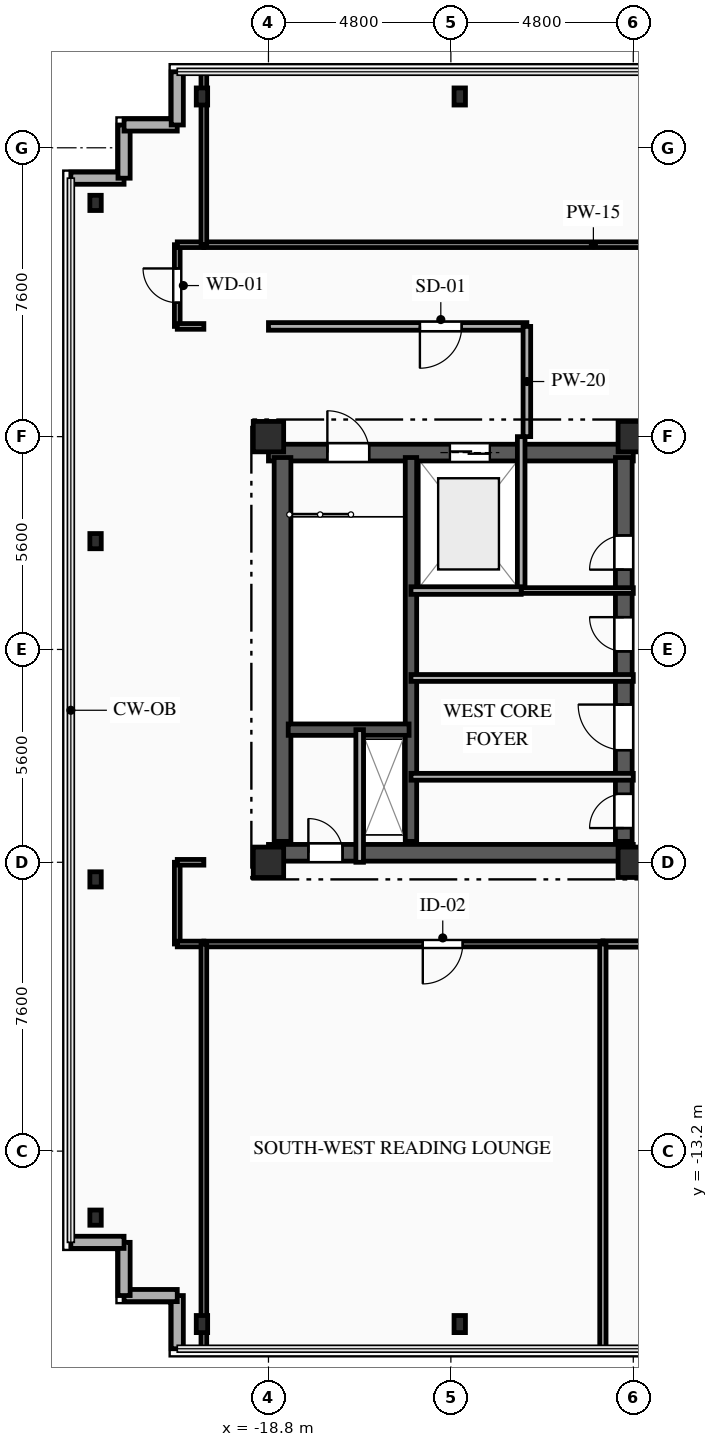
"""IFC4 building model, lengths in metres.
Left out: names, types, materials, properties, quantities, classifications, styles, units other than length and angle.
Written with IfcOpenShell. Run it as: python <this file> out.ifc"""

import sys

from ifc_helpers import new_model, si_unit, direction, frame, frame_2d, origin, origin_2d, place, context, subcontext, project, spatial, rectangle, i_section, extrude, element, fill, save


model = new_model("IFC4")
c1 = context("Model", 3, precision=1e-05, world=origin(), true_north=direction((0.0, 1.0)))
c2 = subcontext(c1, "Body", "Model", "MODEL_VIEW")
j1 = project(units=[si_unit("LENGTHUNIT", "METRE"), si_unit("PLANEANGLEUNIT", "RADIAN")], contexts=[c1])
p1 = place(None, origin())
s1 = spatial("IfcSite", under=j1, at=p1, CompositionType="ELEMENT")
p2 = place(p1, origin())
s2 = spatial("IfcBuilding", under=s1, at=p2, CompositionType="ELEMENT")
p3 = place(p2, frame((0.0, 0.0, 266.0)))
s3 = spatial("IfcBuildingStorey", under=s2, at=p3, CompositionType="ELEMENT", Elevation=266.0)
for number, where, z_axis, x_axis in (
    (1, (-18.8, -5.6, 0.0), (0.0, 0.0, 1.0), (1.0, 0.0, 0.0)),
    (2, (-18.8, 5.6, 0.0), (0.0, 0.0, 1.0), (1.0, 0.0, 0.0)),
    (3, (-9.2, -5.6, 0.0), (0.0, 0.0, 1.0), (1.0, 0.0, 0.0)),
    (4, (-9.2, 5.6, 0.0), (0.0, 0.0, 1.0), (1.0, 0.0, 0.0)),
):
    element("IfcColumn", number, at=place(p3, frame(where, z_axis=z_axis, x_axis=x_axis)), inside=s3, PredefinedType="COLUMN", context=c2, shape_type="SweptSolid", body=[
        extrude(rectangle(XDim=0.8, YDim=0.8, at=origin_2d()), origin(), (0.0, 0.0, 1.0), 4.2),
    ])
for number, where, z_axis, x_axis in (
    (5, (-20.55, -17.75, 0.0), (0.0, 0.0, 1.0), (1.0, 0.0, 0.0)),
    (6, (-13.767, -17.75, 0.0), (0.0, 0.0, 1.0), (1.0, 0.0, 0.0)),
    (7, (-13.767, 14.55, 0.0), (0.0, 0.0, 1.0), (1.0, 0.0, 0.0)),
    (8, (-20.55, 14.55, 0.0), (0.0, 0.0, 1.0), (1.0, 0.0, 0.0)),
):
    element("IfcColumn", number, at=place(p3, frame(where, z_axis=z_axis, x_axis=x_axis)), inside=s3, PredefinedType="COLUMN", context=c2, shape_type="SweptSolid", body=[
        extrude(i_section(OverallWidth=0.3, OverallDepth=0.45, WebThickness=0.014, FlangeThickness=0.026, FilletRadius=0.027, at=origin_2d()), origin(), (0.0, 0.0, 1.0), 4.2),
    ])
for number, where, z_axis, x_axis in (
    (9, (-23.35, 11.75, 0.0), (0.0, 0.0, 1.0), (1.0, 0.0, 0.0)),
    (10, (-23.35, 2.85, 0.0), (0.0, 0.0, 1.0), (1.0, 0.0, 0.0)),
    (11, (-23.35, -6.05, 0.0), (0.0, 0.0, 1.0), (1.0, 0.0, 0.0)),
    (12, (-23.35, -14.95, 0.0), (0.0, 0.0, 1.0), (1.0, 0.0, 0.0)),
):
    element("IfcColumn", number, at=place(p3, frame(where, z_axis=z_axis, x_axis=x_axis)), inside=s3, PredefinedType="COLUMN", context=c2, shape_type="SweptSolid", body=[
        extrude(i_section(OverallWidth=0.3, OverallDepth=0.4, WebThickness=0.013, FlangeThickness=0.024, FilletRadius=0.027, at=origin_2d()), origin(), (0.0, 0.0, 1.0), 4.2),
    ])
p4 = place(p3, frame((-21.2, -18.4, 0.0), z_axis=(0.0, 0.0, 1.0), x_axis=(0.0, 1.0, 0.0)))
e13 = element("IfcWall", 13, at=p4, inside=s3, PredefinedType="SOLIDWALL", context=c2, shape_type="SweptSolid", body=[
    extrude(rectangle(XDim=1.4, YDim=0.32, at=frame_2d((0.7, 0.0))), origin(), (0.0, 0.0, 1.0), 3.8),
])
p5 = place(p3, frame((-21.2, -17.0, 0.0), z_axis=(0.0, 0.0, 1.0), x_axis=(-1.0, 0.0, 0.0)))
e14 = element("IfcWall", 14, at=p5, inside=s3, PredefinedType="SOLIDWALL", context=c2, shape_type="SweptSolid", body=[
    extrude(rectangle(XDim=1.4, YDim=0.32, at=frame_2d((0.7, 0.0))), origin(), (0.0, 0.0, 1.0), 3.8),
])
for number, where, z_axis, x_axis in (
    (15, (-22.6, -17.0, 0.0), (0.0, 0.0, 1.0), (0.0, 1.0, 0.0)),
    (16, (-22.6, -15.6, 0.0), (0.0, 0.0, 1.0), (-1.0, 0.0, 0.0)),
    (17, (-24.0, 12.4, 0.0), (0.0, 0.0, 1.0), (1.0, 0.0, 0.0)),
):
    element("IfcWall", number, at=place(p3, frame(where, z_axis=z_axis, x_axis=x_axis)), inside=s3, PredefinedType="SOLIDWALL", context=c2, shape_type="SweptSolid", body=[
        extrude(rectangle(XDim=1.4, YDim=0.32, at=frame_2d((0.7, 0.0))), origin(), (0.0, 0.0, 1.0), 3.8),
    ])
for number, where, z_axis, x_axis in (
    (18, (-22.6, 12.4, 0.0), (0.0, 0.0, 1.0), (0.0, 1.0, 0.0)),
    (19, (-22.6, 13.8, 0.0), (0.0, 0.0, 1.0), (1.0, 0.0, 0.0)),
):
    element("IfcWall", number, at=place(p3, frame(where, z_axis=z_axis, x_axis=x_axis)), inside=s3, PredefinedType="SOLIDWALL", context=c2, shape_type="SweptSolid", body=[
        extrude(rectangle(XDim=1.4, YDim=0.32, at=frame_2d((0.7, 0.0))), origin(), (0.0, 0.0, 1.0), 3.8),
    ])
p6 = place(p3, frame((-21.2, 13.8, 0.0), z_axis=(0.0, 0.0, 1.0), x_axis=(0.0, 1.0, 0.0)))
e20 = element("IfcWall", 20, at=p6, inside=s3, PredefinedType="SOLIDWALL", context=c2, shape_type="SweptSolid", body=[
    extrude(rectangle(XDim=1.4, YDim=0.32, at=frame_2d((0.7, 0.0))), origin(), (0.0, 0.0, 1.0), 3.8),
])
p7 = place(p3, frame((-18.8, 5.18, 0.0), z_axis=(0.0, 0.0, 1.0), x_axis=(1.0, 0.0, 0.0)))
e21 = element("IfcWall", 21, at=p7, inside=s3, PredefinedType="SHEAR", context=c2, shape_type="SweptSolid", body=[
    extrude(rectangle(XDim=9.6, YDim=0.44, at=frame_2d((4.8, 0.0))), origin(), (0.0, 0.0, 1.0), 3.8),
])
p8 = place(p7, frame((1.55, 0.0, 0.0)))
e22 = element("IfcOpeningElement", 22, at=p8, cuts=e21, PredefinedType="OPENING", context=c2, shape_type="SweptSolid", body=[
    extrude(rectangle(XDim=1.1, YDim=2.15, at=frame_2d((0.55, 1.075))), frame((0.0, 0.23, 0.0), z_axis=(0.0, -1.0, 0.0), x_axis=(1.0, 0.0, 0.0)), (0.0, 0.0, 1.0), 0.46),
])
p9 = place(p7, frame((4.775, 0.0, 0.0)))
e23 = element("IfcOpeningElement", 23, at=p9, cuts=e21, PredefinedType="OPENING", context=c2, shape_type="SweptSolid", body=[
    extrude(rectangle(XDim=1.05, YDim=2.1, at=frame_2d((0.525, 1.05))), frame((0.0, 0.23, 0.0), z_axis=(0.0, -1.0, 0.0), x_axis=(1.0, 0.0, 0.0)), (0.0, 0.0, 1.0), 0.46),
])
p10 = place(p3, frame((-18.8, -5.35, 0.0), z_axis=(0.0, 0.0, 1.0), x_axis=(1.0, 0.0, 0.0)))
e24 = element("IfcWall", 24, at=p10, inside=s3, PredefinedType="SHEAR", context=c2, shape_type="SweptSolid", body=[
    extrude(rectangle(XDim=9.6, YDim=0.44, at=frame_2d((4.8, 0.0))), origin(), (0.0, 0.0, 1.0), 3.8),
])
p11 = place(p10, frame((1.05, 0.0, 0.0)))
e25 = element("IfcOpeningElement", 25, at=p11, cuts=e24, PredefinedType="OPENING", context=c2, shape_type="SweptSolid", body=[
    extrude(rectangle(XDim=0.9, YDim=2.1, at=frame_2d((0.45, 1.05))), frame((0.0, 0.23, 0.0), z_axis=(0.0, -1.0, 0.0), x_axis=(1.0, 0.0, 0.0)), (0.0, 0.0, 1.0), 0.46),
])
p12 = place(p3, frame((-18.43, -5.05, 0.0), z_axis=(0.0, 0.0, 1.0), x_axis=(0.0, 1.0, 0.0)))
e26 = element("IfcWall", 26, at=p12, inside=s3, PredefinedType="SHEAR", context=c2, shape_type="SweptSolid", body=[
    extrude(rectangle(XDim=10.1, YDim=0.44, at=frame_2d((5.05, 0.0))), origin(), (0.0, 0.0, 1.0), 3.8),
])
p13 = place(p3, frame((-9.45, -5.05, 0.0), z_axis=(0.0, 0.0, 1.0), x_axis=(0.0, 1.0, 0.0)))
e27 = element("IfcWall", 27, at=p13, inside=s3, PredefinedType="SHEAR", context=c2, shape_type="SweptSolid", body=[
    extrude(rectangle(XDim=10.1, YDim=0.44, at=frame_2d((5.05, 0.0))), origin(), (0.0, 0.0, 1.0), 3.8),
])
p14 = place(p13, frame((7.15, 0.0, 0.0)))
e28 = element("IfcOpeningElement", 28, at=p14, cuts=e27, PredefinedType="OPENING", context=c2, shape_type="SweptSolid", body=[
    extrude(rectangle(XDim=0.9, YDim=2.1, at=frame_2d((0.45, 1.05))), frame((0.0, 0.23, 0.0), z_axis=(0.0, -1.0, 0.0), x_axis=(1.0, 0.0, 0.0)), (0.0, 0.0, 1.0), 0.46),
])
p15 = place(p13, frame((2.4, 0.0, 0.0)))
e29 = element("IfcOpeningElement", 29, at=p15, cuts=e27, PredefinedType="OPENING", context=c2, shape_type="SweptSolid", body=[
    extrude(rectangle(XDim=1.2, YDim=2.15, at=frame_2d((0.6, 1.075))), frame((0.0, 0.23, 0.0), z_axis=(0.0, -1.0, 0.0), x_axis=(1.0, 0.0, 0.0)), (0.0, 0.0, 1.0), 0.46),
])
p16 = place(p13, frame((0.35, 0.0, 0.0)))
e30 = element("IfcOpeningElement", 30, at=p16, cuts=e27, PredefinedType="OPENING", context=c2, shape_type="SweptSolid", body=[
    extrude(rectangle(XDim=0.9, YDim=2.1, at=frame_2d((0.45, 1.05))), frame((0.0, 0.23, 0.0), z_axis=(0.0, -1.0, 0.0), x_axis=(1.0, 0.0, 0.0)), (0.0, 0.0, 1.0), 0.46),
])
p17 = place(p13, frame((5.0, 0.0, 0.0)))
e31 = element("IfcOpeningElement", 31, at=p17, cuts=e27, PredefinedType="OPENING", context=c2, shape_type="SweptSolid", body=[
    extrude(rectangle(XDim=0.9, YDim=2.1, at=frame_2d((0.45, 1.05))), frame((0.0, 0.23, 0.0), z_axis=(0.0, -1.0, 0.0), x_axis=(1.0, 0.0, 0.0)), (0.0, 0.0, 1.0), 0.46),
])
p18 = place(p3, frame((-15.05, -5.05, 0.0), z_axis=(0.0, 0.0, 1.0), x_axis=(0.0, 1.0, 0.0)))
e32 = element("IfcWall", 32, at=p18, inside=s3, PredefinedType="SHEAR", context=c2, shape_type="SweptSolid", body=[
    extrude(rectangle(XDim=10.1, YDim=0.3, at=frame_2d((5.05, 0.0))), origin(), (0.0, 0.0, 1.0), 3.8),
])
p19 = place(p3, frame((-18.28, -2.11, 0.0), z_axis=(0.0, 0.0, 1.0), x_axis=(1.0, 0.0, 0.0)))
e33 = element("IfcWall", 33, at=p19, inside=s3, PredefinedType="SHEAR", context=c2, shape_type="SweptSolid", body=[
    extrude(rectangle(XDim=3.18, YDim=0.3, at=frame_2d((1.59, 0.0))), origin(), (0.0, 0.0, 1.0), 3.8),
])
p20 = place(p3, frame((-16.4, -5.6, 0.0), z_axis=(0.0, 0.0, 1.0), x_axis=(0.0, 1.0, 0.0)))
e34 = element("IfcWall", 34, at=p20, inside=s3, PredefinedType="PARTITIONING", context=c2, shape_type="SweptSolid", body=[
    extrude(rectangle(XDim=3.49, YDim=0.2, at=frame_2d((1.745, 0.0))), origin(), (0.0, 0.0, 1.0), 3.8),
])
p21 = place(p3, frame((-12.15, 1.55, 0.0), z_axis=(0.0, 0.0, 1.0), x_axis=(0.0, 1.0, 0.0)))
e35 = element("IfcWall", 35, at=p21, inside=s3, PredefinedType="PARTITIONING", context=c2, shape_type="SweptSolid", body=[
    extrude(rectangle(XDim=4.05, YDim=0.2, at=frame_2d((2.025, 0.0))), origin(), (0.0, 0.0, 1.0), 3.8),
])
p22 = place(p3, frame((-12.0, 8.5, 0.0), z_axis=(0.0, 0.0, 1.0), x_axis=(-1.0, 0.0, 0.0)))
e36 = element("IfcWall", 36, at=p22, inside=s3, PredefinedType="PARTITIONING", context=c2, shape_type="SweptSolid", body=[
    extrude(rectangle(XDim=6.8, YDim=0.2, at=frame_2d((3.4, 0.0))), origin(), (0.0, 0.0, 1.0), 3.8),
])
p23 = place(p22, frame((1.715, 0.0, 0.0)))
e37 = element("IfcOpeningElement", 37, at=p23, cuts=e36, PredefinedType="OPENING", context=c2, shape_type="SweptSolid", body=[
    extrude(rectangle(XDim=1.1, YDim=2.15, at=frame_2d((0.55, 1.075))), frame((0.0, 0.11, 0.0), z_axis=(0.0, -1.0, 0.0), x_axis=(1.0, 0.0, 0.0)), (0.0, 0.0, 1.0), 0.22),
])
p24 = place(p3, frame((-12.0, 5.6, 0.0), z_axis=(0.0, 0.0, 1.0), x_axis=(0.0, 1.0, 0.0)))
e38 = element("IfcWall", 38, at=p24, inside=s3, PredefinedType="PARTITIONING", context=c2, shape_type="SweptSolid", body=[
    extrude(rectangle(XDim=2.9, YDim=0.2, at=frame_2d((1.45, 0.0))), origin(), (0.0, 0.0, 1.0), 3.8),
])
p25 = place(p3, frame((-12.15, 1.55, 0.0), z_axis=(0.0, 0.0, 1.0), x_axis=(1.0, 0.0, 0.0)))
e39 = element("IfcWall", 39, at=p25, inside=s3, PredefinedType="PARTITIONING", context=c2, shape_type="SweptSolid", body=[
    extrude(rectangle(XDim=2.95, YDim=0.15, at=frame_2d((1.475, 0.0))), origin(), (0.0, 0.0, 1.0), 3.8),
])
for number, where, z_axis, x_axis in (
    (40, (-15.05, -3.35, 0.0), (0.0, 0.0, 1.0), (1.0, 0.0, 0.0)),
    (41, (-9.2, -0.75, 0.0), (0.0, 0.0, 1.0), (-1.0, 0.0, 0.0)),
):
    element("IfcWall", number, at=place(p3, frame(where, z_axis=z_axis, x_axis=x_axis)), inside=s3, PredefinedType="PARTITIONING", context=c2, shape_type="SweptSolid", body=[
        extrude(rectangle(XDim=5.85, YDim=0.18, at=frame_2d((2.925, 0.0))), origin(), (0.0, 0.0, 1.0), 3.8),
    ])
p26 = place(p3, frame((-21.2, 8.5, 0.0), z_axis=(0.0, 0.0, 1.0), x_axis=(0.0, 1.0, 0.0)))
e42 = element("IfcWall", 42, at=p26, inside=s3, PredefinedType="PARTITIONING", context=c2, shape_type="SweptSolid", body=[
    extrude(rectangle(XDim=2.15, YDim=0.15, at=frame_2d((1.075, 0.0))), origin(), (0.0, 0.0, 1.0), 3.455),
])
p27 = place(p26, frame((0.625, 0.0, 0.0)))
e43 = element("IfcOpeningElement", 43, at=p27, cuts=e42, PredefinedType="OPENING", context=c2, shape_type="SweptSolid", body=[
    extrude(rectangle(XDim=0.9, YDim=2.1, at=frame_2d((0.45, 1.05))), frame((0.0, 0.085, 0.0), z_axis=(0.0, -1.0, 0.0), x_axis=(1.0, 0.0, 0.0)), (0.0, 0.0, 1.0), 0.17),
])
for number, where, z_axis, x_axis in (
    (44, (-20.5, 8.5, 0.0), (0.0, 0.0, 1.0), (-1.0, 0.0, 0.0)),
    (45, (-21.2, 10.65, 0.0), (0.0, 0.0, 1.0), (1.0, 0.0, 0.0)),
):
    element("IfcWall", number, at=place(p3, frame(where, z_axis=z_axis, x_axis=x_axis)), inside=s3, PredefinedType="PARTITIONING", context=c2, shape_type="SweptSolid", body=[
        extrude(rectangle(XDim=0.7, YDim=0.15, at=frame_2d((0.35, 0.0))), origin(), (0.0, 0.0, 1.0), 3.8),
    ])
p28 = place(p3, frame((-20.5, 10.65, 0.0), z_axis=(0.0, 0.0, 1.0), x_axis=(1.0, 0.0, 0.0)))
e46 = element("IfcWall", 46, at=p28, inside=s3, PredefinedType="PARTITIONING", context=c2, shape_type="SweptSolid", body=[
    extrude(rectangle(XDim=20.5, YDim=0.15, at=frame_2d((10.25, 0.0))), origin(), (0.0, 0.0, 1.0), 3.8),
])
p29 = place(p28, frame((16.584, 0.0, 0.0)))
e47 = element("IfcOpeningElement", 47, at=p29, cuts=e46, PredefinedType="OPENING", context=c2, shape_type="SweptSolid", body=[
    extrude(rectangle(XDim=1.05, YDim=2.15, at=frame_2d((0.525, 1.075))), frame((0.0, 0.085, 0.0), z_axis=(0.0, -1.0, 0.0), x_axis=(1.0, 0.0, 0.0)), (0.0, 0.0, 1.0), 0.17),
])
p30 = place(p3, frame((0.0, -7.75, 0.0), z_axis=(0.0, 0.0, 1.0), x_axis=(-1.0, 0.0, 0.0)))
e48 = element("IfcWall", 48, at=p30, inside=s3, PredefinedType="PARTITIONING", context=c2, shape_type="SweptSolid", body=[
    extrude(rectangle(XDim=10.0, YDim=0.165, at=frame_2d((5.0, 0.0))), origin(), (0.0, 0.0, 1.0), 3.8),
])
p31 = place(p30, frame((1.554, 0.0, 0.0)))
e49 = element("IfcOpeningElement", 49, at=p31, cuts=e48, PredefinedType="OPENING", context=c2, shape_type="SweptSolid", body=[
    extrude(rectangle(XDim=1.05, YDim=2.15, at=frame_2d((0.525, 1.075))), frame((0.0, 0.093, 0.0), z_axis=(0.0, -1.0, 0.0), x_axis=(1.0, 0.0, 0.0)), (0.0, 0.0, 1.0), 0.185),
])
p32 = place(p3, frame((-10.0, -7.75, 0.0), z_axis=(0.0, 0.0, 1.0), x_axis=(-1.0, 0.0, 0.0)))
e50 = element("IfcWall", 50, at=p32, inside=s3, PredefinedType="PARTITIONING", context=c2, shape_type="SweptSolid", body=[
    extrude(rectangle(XDim=10.5, YDim=0.15, at=frame_2d((5.25, 0.0))), origin(), (0.0, 0.0, 1.0), 3.8),
])
p33 = place(p32, frame((3.689, 0.0, 0.0)))
e51 = element("IfcOpeningElement", 51, at=p33, cuts=e50, PredefinedType="OPENING", context=c2, shape_type="SweptSolid", body=[
    extrude(rectangle(XDim=1.05, YDim=2.15, at=frame_2d((0.525, 1.075))), frame((0.0, 0.085, 0.0), z_axis=(0.0, -1.0, 0.0), x_axis=(1.0, 0.0, 0.0)), (0.0, 0.0, 1.0), 0.17),
])
p34 = place(p3, frame((-21.2, -7.75, 0.0), z_axis=(0.0, 0.0, 1.0), x_axis=(0.0, 1.0, 0.0)))
e52 = element("IfcWall", 52, at=p34, inside=s3, PredefinedType="PARTITIONING", context=c2, shape_type="SweptSolid", body=[
    extrude(rectangle(XDim=2.15, YDim=0.15, at=frame_2d((1.075, 0.0))), origin(), (0.0, 0.0, 1.0), 3.455),
])
for number, where, z_axis, x_axis in (
    (53, (-20.5, -7.75, 0.0), (0.0, 0.0, 1.0), (-1.0, 0.0, 0.0)),
    (54, (-21.2, -5.6, 0.0), (0.0, 0.0, 1.0), (1.0, 0.0, 0.0)),
):
    element("IfcWall", number, at=place(p3, frame(where, z_axis=z_axis, x_axis=x_axis)), inside=s3, PredefinedType="PARTITIONING", context=c2, shape_type="SweptSolid", body=[
        extrude(rectangle(XDim=0.7, YDim=0.15, at=frame_2d((0.35, 0.0))), origin(), (0.0, 0.0, 1.0), 3.8),
    ])
p35 = place(p3, frame((-10.0, -18.4, 0.0), z_axis=(0.0, 0.0, 1.0), x_axis=(0.0, 1.0, 0.0)))
e55 = element("IfcWall", 55, at=p35, inside=s3, PredefinedType="PARTITIONING", context=c2, shape_type="SweptSolid", body=[
    extrude(rectangle(XDim=10.65, YDim=0.165, at=frame_2d((5.325, 0.0))), origin(), (0.0, 0.0, 1.0), 3.8),
])
p36 = place(p3, frame((-20.5, -18.4, 0.0), z_axis=(0.0, 0.0, 1.0), x_axis=(0.0, 1.0, 0.0)))
e56 = element("IfcWall", 56, at=p36, inside=s3, PredefinedType="PARTITIONING", context=c2, shape_type="SweptSolid", body=[
    extrude(rectangle(XDim=10.65, YDim=0.15, at=frame_2d((5.325, 0.0))), origin(), (0.0, 0.0, 1.0), 3.425),
])
p37 = place(p3, frame((-20.5, 15.2, 0.0), z_axis=(0.0, 0.0, 1.0), x_axis=(0.0, -1.0, 0.0)))
e57 = element("IfcWall", 57, at=p37, inside=s3, PredefinedType="PARTITIONING", context=c2, shape_type="SweptSolid", body=[
    extrude(rectangle(XDim=4.55, YDim=0.15, at=frame_2d((2.275, 0.0))), origin(), (0.0, 0.0, 1.0), 3.425),
])
p38 = place(p3, frame((-15.05, 1.55, 0.0), z_axis=(0.0, 0.0, 1.0), x_axis=(1.0, 0.0, 0.0)))
e58 = element("IfcWall", 58, at=p38, inside=s3, PredefinedType="PARTITIONING", context=c2, shape_type="SweptSolid", body=[
    extrude(rectangle(XDim=2.9, YDim=0.2, at=frame_2d((1.45, 0.0))), origin(), (0.0, 0.0, 1.0), 3.8),
])
p39 = place(p8, origin())
e59 = element("IfcDoor", 59, at=p39, inside=s3, OperationType="SINGLE_SWING_LEFT", PredefinedType="DOOR", context=c2, shape_type="SweptSolid", body=[
    extrude(rectangle(XDim=1.1, YDim=2.15, at=frame_2d((0.55, 1.075))), frame((0.0, 0.025, 0.0), z_axis=(0.0, -1.0, 0.0), x_axis=(1.0, 0.0, 0.0)), (0.0, 0.0, 1.0), 0.05),
])
fill(e22, e59)
p40 = place(p9, origin())
e60 = element("IfcDoor", 60, at=p40, inside=s3, OperationType="DOUBLE_DOOR_SLIDING", PredefinedType="DOOR", context=c2, shape_type="SweptSolid", body=[
    extrude(rectangle(XDim=1.05, YDim=2.1, at=frame_2d((0.525, 1.05))), frame((0.0, 0.025, 0.0), z_axis=(0.0, -1.0, 0.0), x_axis=(1.0, 0.0, 0.0)), (0.0, 0.0, 1.0), 0.05),
])
fill(e23, e60)
p41 = place(p11, origin())
e61 = element("IfcDoor", 61, at=p41, inside=s3, OperationType="SINGLE_SWING_LEFT", PredefinedType="DOOR", context=c2, shape_type="SweptSolid", body=[
    extrude(rectangle(XDim=0.9, YDim=2.1, at=frame_2d((0.45, 1.05))), frame((0.0, 0.025, 0.0), z_axis=(0.0, -1.0, 0.0), x_axis=(1.0, 0.0, 0.0)), (0.0, 0.0, 1.0), 0.05),
])
fill(e25, e61)
p42 = place(p23, origin())
e62 = element("IfcDoor", 62, at=p42, inside=s3, OperationType="SINGLE_SWING_RIGHT", PredefinedType="DOOR", context=c2, shape_type="SweptSolid", body=[
    extrude(rectangle(XDim=1.1, YDim=2.15, at=frame_2d((0.55, 1.075))), frame((0.0, 0.025, 0.0), z_axis=(0.0, -1.0, 0.0), x_axis=(1.0, 0.0, 0.0)), (0.0, 0.0, 1.0), 0.05),
])
fill(e37, e62)
p43 = place(p14, origin())
e63 = element("IfcDoor", 63, at=p43, inside=s3, OperationType="SINGLE_SWING_LEFT", PredefinedType="DOOR", context=c2, shape_type="SweptSolid", body=[
    extrude(rectangle(XDim=0.9, YDim=2.1, at=frame_2d((0.45, 1.05))), frame((0.0, 0.025, 0.0), z_axis=(0.0, -1.0, 0.0), x_axis=(1.0, 0.0, 0.0)), (0.0, 0.0, 1.0), 0.05),
])
fill(e28, e63)
p44 = place(p15, origin())
e64 = element("IfcDoor", 64, at=p44, inside=s3, OperationType="SINGLE_SWING_RIGHT", PredefinedType="DOOR", context=c2, shape_type="SweptSolid", body=[
    extrude(rectangle(XDim=1.2, YDim=2.15, at=frame_2d((0.6, 1.075))), frame((0.0, 0.025, 0.0), z_axis=(0.0, -1.0, 0.0), x_axis=(1.0, 0.0, 0.0)), (0.0, 0.0, 1.0), 0.05),
])
fill(e29, e64)
p45 = place(p16, origin())
e65 = element("IfcDoor", 65, at=p45, inside=s3, OperationType="SINGLE_SWING_LEFT", PredefinedType="DOOR", context=c2, shape_type="SweptSolid", body=[
    extrude(rectangle(XDim=0.9, YDim=2.1, at=frame_2d((0.45, 1.05))), frame((0.0, 0.025, 0.0), z_axis=(0.0, -1.0, 0.0), x_axis=(1.0, 0.0, 0.0)), (0.0, 0.0, 1.0), 0.05),
])
fill(e30, e65)
p46 = place(p17, origin())
e66 = element("IfcDoor", 66, at=p46, inside=s3, OperationType="SINGLE_SWING_RIGHT", PredefinedType="DOOR", context=c2, shape_type="SweptSolid", body=[
    extrude(rectangle(XDim=0.9, YDim=2.1, at=frame_2d((0.45, 1.05))), frame((0.0, 0.025, 0.0), z_axis=(0.0, -1.0, 0.0), x_axis=(1.0, 0.0, 0.0)), (0.0, 0.0, 1.0), 0.05),
])
fill(e31, e66)
p47 = place(p27, origin())
e67 = element("IfcDoor", 67, at=p47, inside=s3, OperationType="SINGLE_SWING_RIGHT", PredefinedType="DOOR", context=c2, shape_type="SweptSolid", body=[
    extrude(rectangle(XDim=0.9, YDim=2.1, at=frame_2d((0.45, 1.05))), frame((0.0, 0.025, 0.0), z_axis=(0.0, -1.0, 0.0), x_axis=(1.0, 0.0, 0.0)), (0.0, 0.0, 1.0), 0.05),
])
fill(e43, e67)
p48 = place(p33, origin())
e68 = element("IfcDoor", 68, at=p48, inside=s3, OperationType="SINGLE_SWING_RIGHT", PredefinedType="DOOR", context=c2, shape_type="SweptSolid", body=[
    extrude(rectangle(XDim=1.05, YDim=2.15, at=frame_2d((0.525, 1.075))), frame((0.0, 0.025, 0.0), z_axis=(0.0, -1.0, 0.0), x_axis=(1.0, 0.0, 0.0)), (0.0, 0.0, 1.0), 0.05),
])
fill(e51, e68)
save(model, sys.argv[1])
